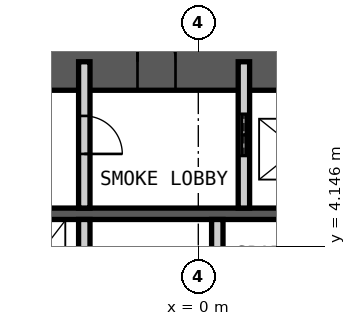
"""IFC4 building model, lengths in metres.
Left out: names, types, materials, properties, quantities, classifications, styles, units other than length and angle.
Written with IfcOpenShell. Run it as: python <this file> out.ifc"""

import sys

from ifc_helpers import new_model, si_unit, direction, frame, frame_2d, origin, place, context, subcontext, project, spatial, rectangle, extrude, element, fill, save


model = new_model("IFC4")
c1 = context("Model", 3, precision=1e-05, world=origin(), true_north=direction((0.0, 1.0)))
c2 = subcontext(c1, "Body", "Model", "MODEL_VIEW")
j1 = project(units=[si_unit("LENGTHUNIT", "METRE"), si_unit("PLANEANGLEUNIT", "RADIAN")], contexts=[c1])
p1 = place(None, origin())
s1 = spatial("IfcSite", under=j1, at=p1, CompositionType="ELEMENT")
p2 = place(p1, origin())
s2 = spatial("IfcBuilding", under=s1, at=p2, CompositionType="ELEMENT")
p3 = place(p2, frame((0.0, 0.0, -12.0)))
s3 = spatial("IfcBuildingStorey", under=s2, at=p3, CompositionType="ELEMENT", Elevation=-12.0)
p4 = place(p3, frame((-12.0, 9.0, -0.2), z_axis=(0.0, 0.0, 1.0), x_axis=(1.0, 0.0, 0.0)))
e1 = element("IfcWall", 1, at=p4, inside=s3, PredefinedType="SHEAR", context=c2, shape_type="SweptSolid", body=[
    extrude(rectangle(XDim=24.0, YDim=1.5, at=frame_2d((12.0, 0.0))), origin(), (0.0, 0.0, 1.0), 6.2),
])
p5 = place(p4, frame((10.4, 0.0, 0.2)))
e2 = element("IfcOpeningElement", 2, at=p5, cuts=e1, PredefinedType="OPENING", context=c2, shape_type="SweptSolid", body=[
    extrude(rectangle(XDim=1.0, YDim=2.1, at=frame_2d((0.5, 1.05))), frame((0.0, 0.76, 0.0), z_axis=(0.0, -1.0, 0.0), x_axis=(1.0, 0.0, 0.0)), (0.0, 0.0, 1.0), 1.52),
])
p6 = place(p4, frame((17.6, 0.0, 0.2)))
e3 = element("IfcOpeningElement", 3, at=p6, cuts=e1, PredefinedType="OPENING", context=c2, shape_type="SweptSolid", body=[
    extrude(rectangle(XDim=0.9, YDim=2.1, at=frame_2d((0.45, 1.05))), frame((0.0, 0.76, 0.0), z_axis=(0.0, -1.0, 0.0), x_axis=(1.0, 0.0, 0.0)), (0.0, 0.0, 1.0), 1.52),
])
p7 = place(p4, frame((21.9, 0.0, 0.2)))
e4 = element("IfcOpeningElement", 4, at=p7, cuts=e1, PredefinedType="OPENING", context=c2, shape_type="SweptSolid", body=[
    extrude(rectangle(XDim=0.9, YDim=2.1, at=frame_2d((0.45, 1.05))), frame((0.0, 0.76, 0.0), z_axis=(0.0, -1.0, 0.0), x_axis=(1.0, 0.0, 0.0)), (0.0, 0.0, 1.0), 1.52),
])
p8 = place(p3, frame((-12.0, 5.0, -0.2), z_axis=(0.0, 0.0, 1.0), x_axis=(1.0, 0.0, 0.0)))
e5 = element("IfcWall", 5, at=p8, inside=s3, PredefinedType="SHEAR", context=c2, shape_type="SweptSolid", body=[
    extrude(rectangle(XDim=24.0, YDim=0.3, at=frame_2d((12.0, 0.0))), origin(), (0.0, 0.0, 1.0), 6.2),
])
p9 = place(p3, frame((-3.0, 5.15, 0.0), z_axis=(0.0, 0.0, 1.0), x_axis=(0.0, 1.0, 0.0)))
e6 = element("IfcWall", 6, at=p9, inside=s3, PredefinedType="PARTITIONING", context=c2, shape_type="SweptSolid", body=[
    extrude(rectangle(XDim=3.85, YDim=0.3, at=frame_2d((1.925, 0.0))), origin(), (0.0, 0.0, 1.0), 5.78),
])
p10 = place(p9, frame((1.425, 0.0, 0.0)))
e7 = element("IfcOpeningElement", 7, at=p10, cuts=e6, PredefinedType="OPENING", context=c2, shape_type="SweptSolid", body=[
    extrude(rectangle(XDim=1.0, YDim=2.1, at=frame_2d((0.5, 1.05))), frame((0.0, 0.16, 0.0), z_axis=(0.0, -1.0, 0.0), x_axis=(1.0, 0.0, 0.0)), (0.0, 0.0, 1.0), 0.32),
])
p11 = place(p3, frame((1.2, 5.15, 0.0), z_axis=(0.0, 0.0, 1.0), x_axis=(0.0, 1.0, 0.0)))
e8 = element("IfcWall", 8, at=p11, inside=s3, PredefinedType="PARTITIONING", context=c2, shape_type="SweptSolid", body=[
    extrude(rectangle(XDim=3.85, YDim=0.3, at=frame_2d((1.925, 0.0))), origin(), (0.0, 0.0, 1.0), 5.78),
])
p12 = place(p11, frame((1.375, 0.0, 0.0)))
e9 = element("IfcOpeningElement", 9, at=p12, cuts=e8, PredefinedType="OPENING", context=c2, shape_type="SweptSolid", body=[
    extrude(rectangle(XDim=1.1, YDim=2.4, at=frame_2d((0.55, 1.2))), frame((0.0, 0.16, 0.0), z_axis=(0.0, -1.0, 0.0), x_axis=(1.0, 0.0, 0.0)), (0.0, 0.0, 1.0), 0.32),
])
for number, where, z_axis, x_axis in (
    (10, (-3.0, 2.2, 0.0), (0.0, 0.0, 1.0), (0.0, 1.0, 0.0)),
    (11, (0.5, 2.2, 0.0), (0.0, 0.0, 1.0), (0.0, 1.0, 0.0)),
):
    element("IfcWall", number, at=place(p3, frame(where, z_axis=z_axis, x_axis=x_axis)), inside=s3, PredefinedType="PARTITIONING", context=c2, shape_type="SweptSolid", body=[
        extrude(rectangle(XDim=2.65, YDim=0.3, at=frame_2d((1.325, 0.0))), origin(), (0.0, 0.0, 1.0), 5.78),
    ])
p13 = place(p5, origin())
e12 = element("IfcDoor", 12, at=p13, inside=s3, OperationType="SINGLE_SWING_RIGHT", PredefinedType="DOOR", context=c2, shape_type="SweptSolid", body=[
    extrude(rectangle(XDim=1.0, YDim=2.1, at=frame_2d((0.5, 1.05))), frame((0.0, 0.025, 0.0), z_axis=(0.0, -1.0, 0.0), x_axis=(1.0, 0.0, 0.0)), (0.0, 0.0, 1.0), 0.05),
])
fill(e2, e12)
p14 = place(p10, origin())
e13 = element("IfcDoor", 13, at=p14, inside=s3, OperationType="SINGLE_SWING_LEFT", PredefinedType="DOOR", context=c2, shape_type="SweptSolid", body=[
    extrude(rectangle(XDim=1.0, YDim=2.1, at=frame_2d((0.5, 1.05))), frame((0.0, 0.025, 0.0), z_axis=(0.0, -1.0, 0.0), x_axis=(1.0, 0.0, 0.0)), (0.0, 0.0, 1.0), 0.05),
])
fill(e7, e13)
p15 = place(p12, origin())
e14 = element("IfcDoor", 14, at=p15, inside=s3, OperationType="DOUBLE_DOOR_SLIDING", PredefinedType="DOOR", context=c2, shape_type="SweptSolid", body=[
    extrude(rectangle(XDim=1.1, YDim=2.4, at=frame_2d((0.55, 1.2))), frame((0.0, 0.025, 0.0), z_axis=(0.0, -1.0, 0.0), x_axis=(1.0, 0.0, 0.0)), (0.0, 0.0, 1.0), 0.05),
])
fill(e9, e14)
save(model, sys.argv[1])
